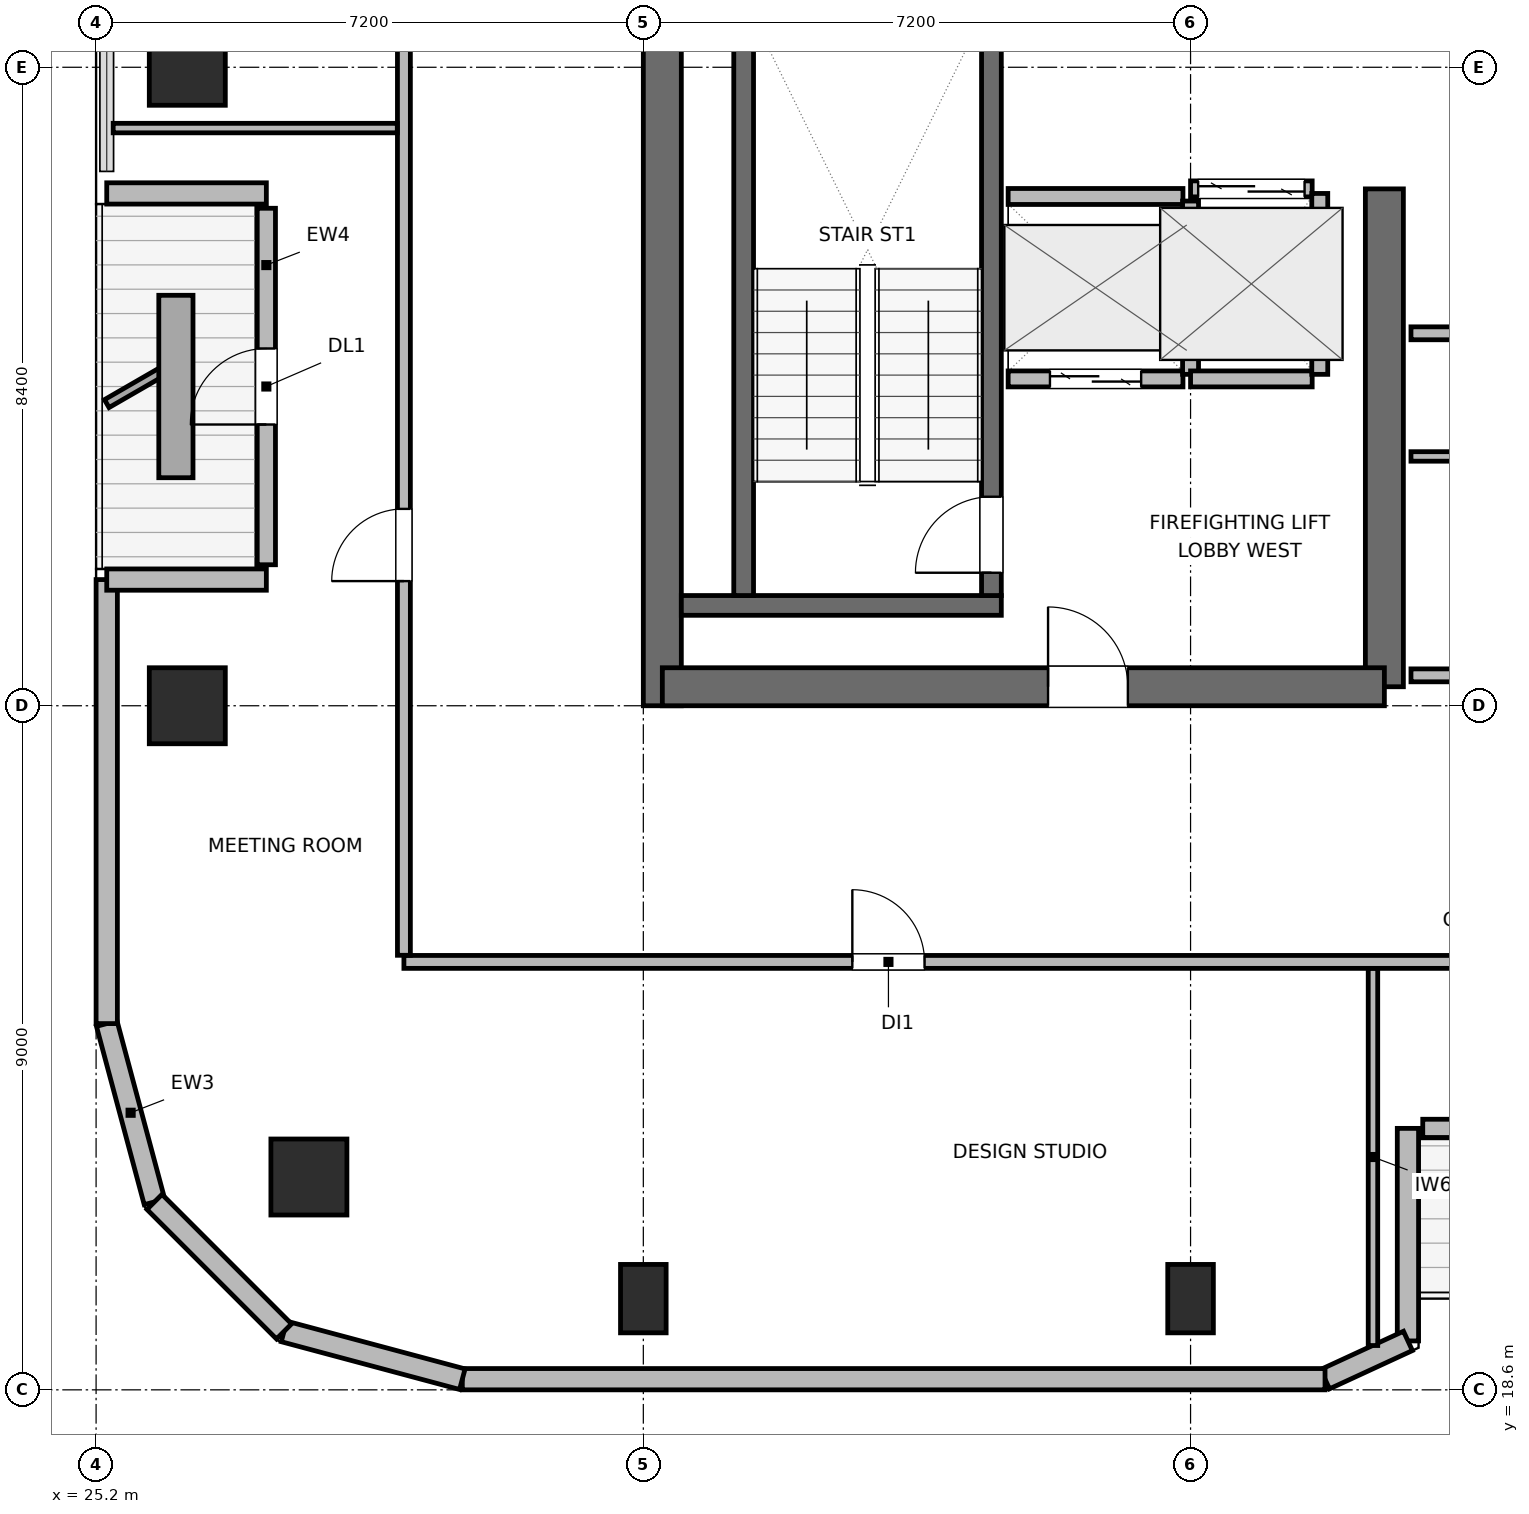
"""IFC4 building model, lengths in metres.
Left out: names, types, materials, properties, quantities, classifications, styles, units other than length and angle.
Written with IfcOpenShell. Run it as: python <this file> out.ifc"""

import sys

from ifc_helpers import new_model, si_unit, direction, frame, frame_2d, origin, origin_2d, place, context, subcontext, project, spatial, rectangle, circle, extrude, element, fill, save


model = new_model("IFC4")
c1 = context("Model", 3, precision=1e-05, world=origin(), true_north=direction((0.0, 1.0)))
c2 = subcontext(c1, "Body", "Model", "MODEL_VIEW")
j1 = project(units=[si_unit("LENGTHUNIT", "METRE"), si_unit("PLANEANGLEUNIT", "RADIAN")], contexts=[c1])
p1 = place(None, origin())
s1 = spatial("IfcSite", under=j1, at=p1, CompositionType="ELEMENT")
p2 = place(p1, origin())
s2 = spatial("IfcBuilding", under=s1, at=p2, CompositionType="ELEMENT")
p3 = place(p2, frame((0.0, 0.0, 290.1)))
s3 = spatial("IfcBuildingStorey", under=s2, at=p3, CompositionType="ELEMENT", Elevation=290.1)
p4 = place(p3, frame((32.65, 27.6, 0.0), z_axis=(0.0, 0.0, 1.0), x_axis=(0.0, 1.0, 0.0)))
e1 = element("IfcWall", 1, at=p4, inside=s3, PredefinedType="SHEAR", context=c2, shape_type="SweptSolid", body=[
    extrude(rectangle(XDim=16.8, YDim=0.5, at=frame_2d((8.4, 0.0))), origin(), (0.0, 0.0, 1.0), 3.9),
])
p5 = place(p3, frame((42.15, 27.85, 0.0), z_axis=(0.0, 0.0, 1.0), x_axis=(0.0, 1.0, 0.0)))
e2 = element("IfcWall", 2, at=p5, inside=s3, PredefinedType="SHEAR", context=c2, shape_type="SweptSolid", body=[
    extrude(rectangle(XDim=6.55, YDim=0.5, at=frame_2d((3.275, 0.0))), origin(), (0.0, 0.0, 1.0), 3.9),
])
p6 = place(p3, frame((32.65, 27.85, 0.0), z_axis=(0.0, 0.0, 1.0), x_axis=(1.0, 0.0, 0.0)))
e3 = element("IfcWall", 3, at=p6, inside=s3, PredefinedType="SHEAR", context=c2, shape_type="SweptSolid", body=[
    extrude(rectangle(XDim=9.5, YDim=0.5, at=frame_2d((4.75, 0.0))), origin(), (0.0, 0.0, 1.0), 3.9),
])
p7 = place(p6, frame((5.075, 0.0, 0.0)))
e4 = element("IfcOpeningElement", 4, at=p7, cuts=e3, PredefinedType="OPENING", context=c2, shape_type="SweptSolid", body=[
    extrude(rectangle(XDim=1.05, YDim=2.04, at=frame_2d((0.525, 1.02))), frame((0.0, 0.26, 0.0), z_axis=(0.0, -1.0, 0.0), x_axis=(1.0, 0.0, 0.0)), (0.0, 0.0, 1.0), 0.52),
])
p8 = place(p3, frame((32.9, 28.92, 0.0), z_axis=(0.0, 0.0, 1.0), x_axis=(1.0, 0.0, 0.0)))
e5 = element("IfcWall", 5, at=p8, inside=s3, PredefinedType="SHEAR", context=c2, shape_type="SweptSolid", body=[
    extrude(rectangle(XDim=4.21, YDim=0.26, at=frame_2d((2.105, 0.0))), origin(), (0.0, 0.0, 1.0), 3.9),
])
p9 = place(p3, frame((33.72, 29.05, 0.0), z_axis=(0.0, 0.0, 1.0), x_axis=(0.0, 1.0, 0.0)))
e6 = element("IfcWall", 6, at=p9, inside=s3, PredefinedType="SHEAR", context=c2, shape_type="SweptSolid", body=[
    extrude(rectangle(XDim=7.6, YDim=0.26, at=frame_2d((3.8, 0.0))), origin(), (0.0, 0.0, 1.0), 3.9),
])
p10 = place(p3, frame((36.98, 29.05, 0.0), z_axis=(0.0, 0.0, 1.0), x_axis=(0.0, 1.0, 0.0)))
e7 = element("IfcWall", 7, at=p10, inside=s3, PredefinedType="SHEAR", context=c2, shape_type="SweptSolid", body=[
    extrude(rectangle(XDim=7.6, YDim=0.26, at=frame_2d((3.8, 0.0))), origin(), (0.0, 0.0, 1.0), 3.9),
])
p11 = place(p10, frame((0.3, 0.0, 0.0)))
e8 = element("IfcOpeningElement", 8, at=p11, cuts=e7, PredefinedType="OPENING", context=c2, shape_type="SweptSolid", body=[
    extrude(rectangle(XDim=1.0, YDim=2.04, at=frame_2d((0.5, 1.02))), frame((0.0, 0.14, 0.0), z_axis=(0.0, -1.0, 0.0), x_axis=(1.0, 0.0, 0.0)), (0.0, 0.0, 1.0), 0.28),
])
p12 = place(p3, frame((28.0, 21.4, 0.0), z_axis=(0.0, 0.0, 1.0), x_axis=(1.0, 0.0, 0.0)))
e9 = element("IfcColumn", 9, at=p12, inside=s3, PredefinedType="COLUMN", context=c2, shape_type="SweptSolid", body=[
    extrude(circle(Radius=0.5, at=origin_2d()), origin(), (0.0, 0.0, 1.0), 3.9),
])
for number, where, z_axis, x_axis in (
    (10, (32.4, 19.8, 0.0), (0.0, 0.0, 1.0), (1.0, 0.0, 0.0)),
    (11, (39.6, 19.8, 0.0), (0.0, 0.0, 1.0), (1.0, 0.0, 0.0)),
):
    element("IfcColumn", number, at=place(p3, frame(where, z_axis=z_axis, x_axis=x_axis)), inside=s3, PredefinedType="COLUMN", context=c2, shape_type="SweptSolid", body=[
        extrude(rectangle(XDim=0.6, YDim=0.9, at=origin_2d()), origin(), (0.0, 0.0, 1.0), 3.9),
    ])
for number, where, z_axis, x_axis in (
    (12, (26.4, 27.6, 0.0), (0.0, 0.0, 1.0), (1.0, 0.0, 0.0)),
    (13, (26.4, 36.0, 0.0), (0.0, 0.0, 1.0), (1.0, 0.0, 0.0)),
):
    element("IfcColumn", number, at=place(p3, frame(where, z_axis=z_axis, x_axis=x_axis)), inside=s3, PredefinedType="COLUMN", context=c2, shape_type="SweptSolid", body=[
        extrude(rectangle(XDim=1.0, YDim=1.0, at=origin_2d()), origin(), (0.0, 0.0, 1.0), 3.9),
    ])
p13 = place(p3, frame((25.969, 21.073, 0.0), z_axis=(0.0, 0.0, 1.0), x_axis=(-0.258751159445, 0.965944013639, 0.0)))
e14 = element("IfcWall", 14, at=p13, inside=s3, PredefinedType="SOLIDWALL", context=c2, shape_type="SweptSolid", body=[
    extrude(rectangle(XDim=2.429, YDim=0.28, at=frame_2d((1.214, 0.0))), origin(), (0.0, 0.0, 1.0), 3.68),
])
p14 = place(p3, frame((25.34, 23.418, 0.0), z_axis=(0.0, 0.0, 1.0), x_axis=(0.0, 1.0, 0.0)))
e15 = element("IfcWall", 15, at=p14, inside=s3, PredefinedType="SOLIDWALL", context=c2, shape_type="SweptSolid", body=[
    extrude(rectangle(XDim=5.842, YDim=0.28, at=frame_2d((2.921, 0.0))), origin(), (0.0, 0.0, 1.0), 3.68),
])
p15 = place(p3, frame((25.34, 29.26, 0.0), z_axis=(0.0, 0.0, 1.0), x_axis=(1.0, 0.0, 0.0)))
e16 = element("IfcWall", 16, at=p15, inside=s3, PredefinedType="SOLIDWALL", context=c2, shape_type="SweptSolid", body=[
    extrude(rectangle(XDim=2.1, YDim=0.28, at=frame_2d((1.05, 0.0))), origin(), (0.0, 0.0, 1.0), 3.126),
])
p16 = place(p3, frame((27.44, 29.455, 0.0), z_axis=(0.0, 0.0, 1.0), x_axis=(0.0, 1.0, 0.0)))
e17 = element("IfcWall", 17, at=p16, inside=s3, PredefinedType="SOLIDWALL", context=c2, shape_type="SweptSolid", body=[
    extrude(rectangle(XDim=4.69, YDim=0.24, at=frame_2d((2.345, 0.0))), origin(), (0.0, 0.0, 1.0), 3.311),
])
p17 = place(p16, frame((1.845, 0.0, 0.0)))
e18 = element("IfcOpeningElement", 18, at=p17, cuts=e17, PredefinedType="OPENING", context=c2, shape_type="SweptSolid", body=[
    extrude(rectangle(XDim=1.0, YDim=2.02, at=frame_2d((0.5, 1.01))), frame((0.0, 0.13, 0.0), z_axis=(0.0, -1.0, 0.0), x_axis=(1.0, 0.0, 0.0)), (0.0, 0.0, 1.0), 0.26),
])
p18 = place(p3, frame((27.44, 34.34, 0.0), z_axis=(0.0, 0.0, 1.0), x_axis=(-1.0, 0.0, 0.0)))
e19 = element("IfcWall", 19, at=p18, inside=s3, PredefinedType="SOLIDWALL", context=c2, shape_type="SweptSolid", body=[
    extrude(rectangle(XDim=2.1, YDim=0.28, at=frame_2d((1.05, 0.0))), origin(), (0.0, 0.0, 1.0), 3.126),
])
p19 = place(p3, frame((47.145, 22.04, 0.0), z_axis=(0.0, 0.0, 1.0), x_axis=(-1.0, 0.0, 0.0)))
e20 = element("IfcWall", 20, at=p19, inside=s3, PredefinedType="SOLIDWALL", context=c2, shape_type="SweptSolid", body=[
    extrude(rectangle(XDim=4.49, YDim=0.24, at=frame_2d((2.245, 0.0))), origin(), (0.0, 0.0, 1.0), 3.68),
])
p20 = place(p19, frame((1.745, 0.0, 0.0)))
e21 = element("IfcOpeningElement", 21, at=p20, cuts=e20, PredefinedType="OPENING", context=c2, shape_type="SweptSolid", body=[
    extrude(rectangle(XDim=1.0, YDim=2.02, at=frame_2d((0.5, 1.01))), frame((0.0, 0.13, 0.0), z_axis=(0.0, -1.0, 0.0), x_axis=(1.0, 0.0, 0.0)), (0.0, 0.0, 1.0), 0.26),
])
p21 = place(p3, frame((42.46, 22.04, 0.0), z_axis=(0.0, 0.0, 1.0), x_axis=(0.0, -1.0, 0.0)))
e22 = element("IfcWall", 22, at=p21, inside=s3, PredefinedType="SOLIDWALL", context=c2, shape_type="SweptSolid", body=[
    extrude(rectangle(XDim=2.796, YDim=0.28, at=frame_2d((1.398, 0.0))), origin(), (0.0, 0.0, 1.0), 2.265),
])
p22 = place(p3, frame((42.46, 19.244, 0.0), z_axis=(0.0, 0.0, 1.0), x_axis=(-0.907893953211, -0.419199916176, 0.0)))
e23 = element("IfcWall", 23, at=p22, inside=s3, PredefinedType="SOLIDWALL", context=c2, shape_type="SweptSolid", body=[
    extrude(rectangle(XDim=1.201, YDim=0.28, at=frame_2d((0.601, 0.0))), origin(), (0.0, 0.0, 1.0), 3.68),
])
p23 = place(p3, frame((41.369, 18.74, 0.0), z_axis=(0.0, 0.0, 1.0), x_axis=(-1.0, 0.0, 0.0)))
e24 = element("IfcWall", 24, at=p23, inside=s3, PredefinedType="SOLIDWALL", context=c2, shape_type="SweptSolid", body=[
    extrude(rectangle(XDim=11.351, YDim=0.28, at=frame_2d((5.675, 0.0))), origin(), (0.0, 0.0, 1.0), 3.68),
])
p24 = place(p3, frame((30.018, 18.74, 0.0), z_axis=(0.0, 0.0, 1.0), x_axis=(-0.965937282298, 0.25877628691, 0.0)))
e25 = element("IfcWall", 25, at=p24, inside=s3, PredefinedType="SOLIDWALL", context=c2, shape_type="SweptSolid", body=[
    extrude(rectangle(XDim=2.428, YDim=0.28, at=frame_2d((1.214, 0.0))), origin(), (0.0, 0.0, 1.0), 3.68),
])
p25 = place(p3, frame((27.673, 19.368, 0.0), z_axis=(0.0, 0.0, 1.0), x_axis=(-0.707106781187, 0.707106781187, 0.0)))
e26 = element("IfcWall", 26, at=p25, inside=s3, PredefinedType="SOLIDWALL", context=c2, shape_type="SweptSolid", body=[
    extrude(rectangle(XDim=2.41, YDim=0.28, at=frame_2d((1.205, 0.0))), origin(), (0.0, 0.0, 1.0), 3.68),
])
p26 = place(p3, frame((37.2, 31.9, 0.0), z_axis=(0.0, 0.0, 1.0), x_axis=(1.0, 0.0, 0.0)))
e27 = element("IfcWall", 27, at=p26, inside=s3, PredefinedType="PARTITIONING", context=c2, shape_type="SweptSolid", body=[
    extrude(rectangle(XDim=2.3, YDim=0.21, at=frame_2d((1.15, 0.0))), origin(), (0.0, 0.0, 1.0), 3.68),
])
p27 = place(p26, frame((0.55, 0.0, 0.0)))
e28 = element("IfcOpeningElement", 28, at=p27, cuts=e27, PredefinedType="OPENING", context=c2, shape_type="SweptSolid", body=[
    extrude(rectangle(XDim=1.2, YDim=2.04, at=frame_2d((0.6, 1.02))), frame((0.0, 0.115, 0.0), z_axis=(0.0, -1.0, 0.0), x_axis=(1.0, 0.0, 0.0)), (0.0, 0.0, 1.0), 0.23),
])
p28 = place(p3, frame((37.2, 34.3, 0.0), z_axis=(0.0, 0.0, 1.0), x_axis=(1.0, 0.0, 0.0)))
e29 = element("IfcWall", 29, at=p28, inside=s3, PredefinedType="PARTITIONING", context=c2, shape_type="SweptSolid", body=[
    extrude(rectangle(XDim=2.3, YDim=0.21, at=frame_2d((1.15, 0.0))), origin(), (0.0, 0.0, 1.0), 3.68),
])
p29 = place(p3, frame((39.6, 31.96, 0.0), z_axis=(0.0, 0.0, 1.0), x_axis=(0.0, 1.0, 0.0)))
e30 = element("IfcWall", 30, at=p29, inside=s3, PredefinedType="PARTITIONING", context=c2, shape_type="SweptSolid", body=[
    extrude(rectangle(XDim=2.28, YDim=0.21, at=frame_2d((1.14, 0.0))), origin(), (0.0, 0.0, 1.0), 3.68),
])
p30 = place(p3, frame((39.6, 34.4, 0.0), z_axis=(0.0, 0.0, 1.0), x_axis=(1.0, 0.0, 0.0)))
e31 = element("IfcWall", 31, at=p30, inside=s3, PredefinedType="PARTITIONING", context=c2, shape_type="SweptSolid", body=[
    extrude(rectangle(XDim=1.6, YDim=0.21, at=frame_2d((0.8, 0.0))), origin(), (0.0, 0.0, 1.0), 3.68),
])
p31 = place(p30, frame((0.1, 0.0, 0.0)))
e32 = element("IfcOpeningElement", 32, at=p31, cuts=e31, PredefinedType="OPENING", context=c2, shape_type="SweptSolid", body=[
    extrude(rectangle(XDim=1.4, YDim=2.06, at=frame_2d((0.7, 1.03))), frame((0.0, 0.115, 0.0), z_axis=(0.0, -1.0, 0.0), x_axis=(1.0, 0.0, 0.0)), (0.0, 0.0, 1.0), 0.23),
])
p32 = place(p3, frame((39.6, 31.9, 0.0), z_axis=(0.0, 0.0, 1.0), x_axis=(1.0, 0.0, 0.0)))
e33 = element("IfcWall", 33, at=p32, inside=s3, PredefinedType="PARTITIONING", context=c2, shape_type="SweptSolid", body=[
    extrude(rectangle(XDim=1.6, YDim=0.21, at=frame_2d((0.8, 0.0))), origin(), (0.0, 0.0, 1.0), 3.68),
])
p33 = place(p3, frame((41.3, 31.96, 0.0), z_axis=(0.0, 0.0, 1.0), x_axis=(0.0, 1.0, 0.0)))
e34 = element("IfcWall", 34, at=p33, inside=s3, PredefinedType="PARTITIONING", context=c2, shape_type="SweptSolid", body=[
    extrude(rectangle(XDim=2.38, YDim=0.21, at=frame_2d((1.19, 0.0))), origin(), (0.0, 0.0, 1.0), 3.68),
])
p34 = place(p3, frame((42.5, 28.0, 0.0), z_axis=(0.0, 0.0, 1.0), x_axis=(1.0, 0.0, 0.0)))
e35 = element("IfcWall", 35, at=p34, inside=s3, PredefinedType="PARTITIONING", context=c2, shape_type="SweptSolid", body=[
    extrude(rectangle(XDim=4.213, YDim=0.17, at=frame_2d((2.106, 0.0))), origin(), (0.0, 0.0, 1.0), 2.765),
])
p35 = place(p3, frame((42.5, 32.5, 0.0), z_axis=(0.0, 0.0, 1.0), x_axis=(1.0, 0.0, 0.0)))
e36 = element("IfcWall", 36, at=p35, inside=s3, PredefinedType="PARTITIONING", context=c2, shape_type="SweptSolid", body=[
    extrude(rectangle(XDim=1.3, YDim=0.17, at=frame_2d((0.65, 0.0))), origin(), (0.0, 0.0, 1.0), 3.68),
])
p36 = place(p3, frame((42.5, 30.88, 0.0), z_axis=(0.0, 0.0, 1.0), x_axis=(1.0, 0.0, 0.0)))
e37 = element("IfcWall", 37, at=p36, inside=s3, PredefinedType="PARTITIONING", context=c2, shape_type="SweptSolid", body=[
    extrude(rectangle(XDim=4.213, YDim=0.125, at=frame_2d((2.106, 0.0))), origin(), (0.0, 0.0, 1.0), 3.68),
])
p37 = place(p3, frame((29.25, 24.23, 0.0), z_axis=(0.0, 0.0, 1.0), x_axis=(1.0, 0.0, 0.0)))
e38 = element("IfcWall", 38, at=p37, inside=s3, PredefinedType="PARTITIONING", context=c2, shape_type="SweptSolid", body=[
    extrude(rectangle(XDim=34.35, YDim=0.17, at=frame_2d((17.175, 0.0))), origin(), (0.0, 0.0, 1.0), 3.68),
])
p38 = place(p37, frame((5.9, 0.0, 0.0)))
e39 = element("IfcOpeningElement", 39, at=p38, cuts=e38, PredefinedType="OPENING", context=c2, shape_type="SweptSolid", body=[
    extrude(rectangle(XDim=0.95, YDim=2.04, at=frame_2d((0.475, 1.02))), frame((0.0, 0.095, 0.0), z_axis=(0.0, -1.0, 0.0), x_axis=(1.0, 0.0, 0.0)), (0.0, 0.0, 1.0), 0.19),
])
p39 = place(p37, frame((23.075, 0.0, 0.0)))
e40 = element("IfcOpeningElement", 40, at=p39, cuts=e38, PredefinedType="OPENING", context=c2, shape_type="SweptSolid", body=[
    extrude(rectangle(XDim=0.95, YDim=2.04, at=frame_2d((0.475, 1.02))), frame((0.0, 0.095, 0.0), z_axis=(0.0, -1.0, 0.0), x_axis=(1.0, 0.0, 0.0)), (0.0, 0.0, 1.0), 0.19),
])
p40 = place(p3, frame((29.25, 24.317, 0.0), z_axis=(0.0, 0.0, 1.0), x_axis=(0.0, 1.0, 0.0)))
e41 = element("IfcWall", 41, at=p40, inside=s3, PredefinedType="PARTITIONING", context=c2, shape_type="SweptSolid", body=[
    extrude(rectangle(XDim=23.366, YDim=0.17, at=frame_2d((11.683, 0.0))), origin(), (0.0, 0.0, 1.0), 3.68),
])
p41 = place(p40, frame((4.923, 0.0, 0.0)))
e42 = element("IfcOpeningElement", 42, at=p41, cuts=e41, PredefinedType="OPENING", context=c2, shape_type="SweptSolid", body=[
    extrude(rectangle(XDim=0.95, YDim=2.04, at=frame_2d((0.475, 1.02))), frame((0.0, 0.095, 0.0), z_axis=(0.0, -1.0, 0.0), x_axis=(1.0, 0.0, 0.0)), (0.0, 0.0, 1.0), 0.19),
])
p42 = place(p40, frame((16.693, 0.0, 0.0)))
e43 = element("IfcOpeningElement", 43, at=p42, cuts=e41, PredefinedType="OPENING", context=c2, shape_type="SweptSolid", body=[
    extrude(rectangle(XDim=0.95, YDim=2.04, at=frame_2d((0.475, 1.02))), frame((0.0, 0.095, 0.0), z_axis=(0.0, -1.0, 0.0), x_axis=(1.0, 0.0, 0.0)), (0.0, 0.0, 1.0), 0.19),
])
p43 = place(p3, frame((42.0, 19.183, 0.0), z_axis=(0.0, 0.0, 1.0), x_axis=(0.0, 1.0, 0.0)))
e44 = element("IfcWall", 44, at=p43, inside=s3, PredefinedType="PARTITIONING", context=c2, shape_type="SweptSolid", body=[
    extrude(rectangle(XDim=4.96, YDim=0.125, at=frame_2d((2.48, 0.0))), origin(), (0.0, 0.0, 1.0), 3.043),
])
p44 = place(p3, frame((25.425, 35.2, 0.0), z_axis=(0.0, 0.0, 1.0), x_axis=(1.0, 0.0, 0.0)))
e45 = element("IfcWall", 45, at=p44, inside=s3, PredefinedType="PARTITIONING", context=c2, shape_type="SweptSolid", body=[
    extrude(rectangle(XDim=3.738, YDim=0.125, at=frame_2d((1.869, 0.0))), origin(), (0.0, 0.0, 1.0), 3.68),
])
p45 = place(p17, origin())
e46 = element("IfcDoor", 46, at=p45, inside=s3, OperationType="SINGLE_SWING_LEFT", PredefinedType="DOOR", context=c2, shape_type="SweptSolid", body=[
    extrude(rectangle(XDim=1.0, YDim=2.02, at=frame_2d((0.5, 1.01))), frame((0.0, 0.025, 0.0), z_axis=(0.0, -1.0, 0.0), x_axis=(1.0, 0.0, 0.0)), (0.0, 0.0, 1.0), 0.05),
])
fill(e18, e46)
p46 = place(p11, origin())
e47 = element("IfcDoor", 47, at=p46, inside=s3, OperationType="SINGLE_SWING_LEFT", PredefinedType="DOOR", context=c2, shape_type="SweptSolid", body=[
    extrude(rectangle(XDim=1.0, YDim=2.04, at=frame_2d((0.5, 1.02))), frame((0.0, 0.025, 0.0), z_axis=(0.0, -1.0, 0.0), x_axis=(1.0, 0.0, 0.0)), (0.0, 0.0, 1.0), 0.05),
])
fill(e8, e47)
p47 = place(p27, origin())
e48 = element("IfcDoor", 48, at=p47, inside=s3, OperationType="DOUBLE_DOOR_SLIDING", PredefinedType="DOOR", context=c2, shape_type="SweptSolid", body=[
    extrude(rectangle(XDim=1.2, YDim=2.04, at=frame_2d((0.6, 1.02))), frame((0.0, 0.025, 0.0), z_axis=(0.0, -1.0, 0.0), x_axis=(1.0, 0.0, 0.0)), (0.0, 0.0, 1.0), 0.05),
])
fill(e28, e48)
p48 = place(p31, origin())
e49 = element("IfcDoor", 49, at=p48, inside=s3, OperationType="DOUBLE_DOOR_SLIDING", PredefinedType="DOOR", context=c2, shape_type="SweptSolid", body=[
    extrude(rectangle(XDim=1.4, YDim=2.06, at=frame_2d((0.7, 1.03))), frame((0.0, 0.025, 0.0), z_axis=(0.0, -1.0, 0.0), x_axis=(1.0, 0.0, 0.0)), (0.0, 0.0, 1.0), 0.05),
])
fill(e32, e49)
p49 = place(p7, origin())
e50 = element("IfcDoor", 50, at=p49, inside=s3, OperationType="SINGLE_SWING_LEFT", PredefinedType="DOOR", context=c2, shape_type="SweptSolid", body=[
    extrude(rectangle(XDim=1.05, YDim=2.04, at=frame_2d((0.525, 1.02))), frame((0.0, 0.025, 0.0), z_axis=(0.0, -1.0, 0.0), x_axis=(1.0, 0.0, 0.0)), (0.0, 0.0, 1.0), 0.05),
])
fill(e4, e50)
p50 = place(p38, origin())
e51 = element("IfcDoor", 51, at=p50, inside=s3, OperationType="SINGLE_SWING_LEFT", PredefinedType="DOOR", context=c2, shape_type="SweptSolid", body=[
    extrude(rectangle(XDim=0.95, YDim=2.04, at=frame_2d((0.475, 1.02))), frame((0.0, 0.025, 0.0), z_axis=(0.0, -1.0, 0.0), x_axis=(1.0, 0.0, 0.0)), (0.0, 0.0, 1.0), 0.05),
])
fill(e39, e51)
p51 = place(p41, origin())
e52 = element("IfcDoor", 52, at=p51, inside=s3, OperationType="SINGLE_SWING_LEFT", PredefinedType="DOOR", context=c2, shape_type="SweptSolid", body=[
    extrude(rectangle(XDim=0.95, YDim=2.04, at=frame_2d((0.475, 1.02))), frame((0.0, 0.025, 0.0), z_axis=(0.0, -1.0, 0.0), x_axis=(1.0, 0.0, 0.0)), (0.0, 0.0, 1.0), 0.05),
])
fill(e42, e52)
save(model, sys.argv[1])
